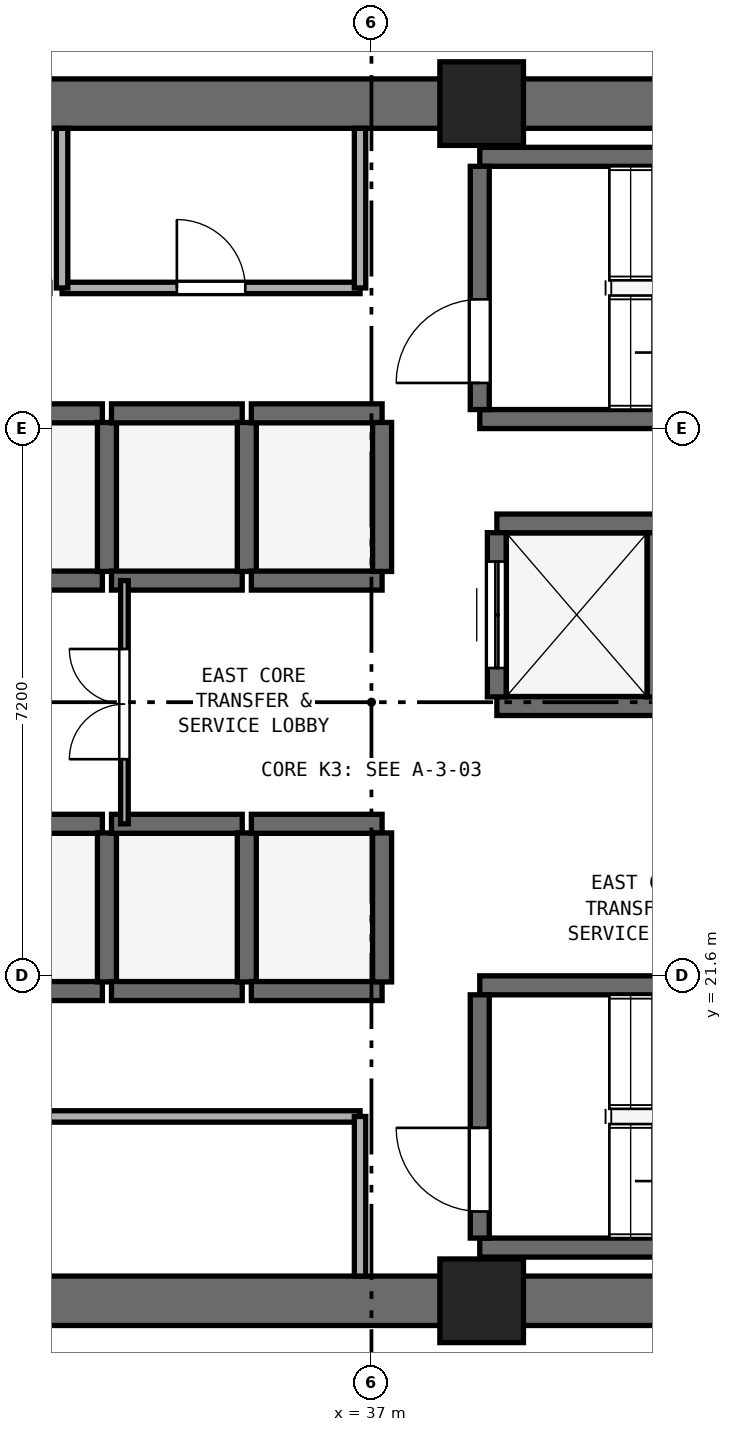
"""IFC4 building model, lengths in metres.
Left out: names, types, materials, properties, quantities, classifications, styles, units other than length and angle.
Written with IfcOpenShell. Run it as: python <this file> out.ifc"""

import sys

from ifc_helpers import new_model, si_unit, direction, frame, frame_2d, origin, origin_2d, place, context, subcontext, project, spatial, rectangle, extrude, element, fill, save


model = new_model("IFC4")
c1 = context("Model", 3, precision=1e-05, world=origin(), true_north=direction((0.0, 1.0)))
c2 = subcontext(c1, "Body", "Model", "MODEL_VIEW")
j1 = project(units=[si_unit("LENGTHUNIT", "METRE"), si_unit("PLANEANGLEUNIT", "RADIAN")], contexts=[c1])
p1 = place(None, origin())
s1 = spatial("IfcSite", under=j1, at=p1, CompositionType="ELEMENT")
p2 = place(p1, origin())
s2 = spatial("IfcBuilding", under=s1, at=p2, CompositionType="ELEMENT")
p3 = place(p2, frame((0.0, 0.0, 59.2)))
s3 = spatial("IfcBuildingStorey", under=s2, at=p3, CompositionType="ELEMENT", Elevation=59.2)
for number, where, z_axis, x_axis in (
    (1, (25.4, 17.325, 0.0), (0.0, 0.0, 1.0), (1.0, 0.0, 0.0)),
    (2, (25.4, 33.075, 0.0), (0.0, 0.0, 1.0), (1.0, 0.0, 0.0)),
):
    element("IfcWall", number, at=place(p3, frame(where, z_axis=z_axis, x_axis=x_axis)), inside=s3, PredefinedType="SHEAR", context=c2, shape_type="SweptSolid", body=[
        extrude(rectangle(XDim=23.2, YDim=0.65, at=frame_2d((11.6, 0.0))), origin(), (0.0, 0.0, 1.0), 3.525),
    ])
for number, where, z_axis, x_axis in (
    (3, (38.45, 17.325, 0.0), (0.0, 0.0, 1.0), (1.0, 0.0, 0.0)),
    (4, (38.45, 33.075, 0.0), (0.0, 0.0, 1.0), (1.0, 0.0, 0.0)),
):
    element("IfcColumn", number, at=place(p3, frame(where, z_axis=z_axis, x_axis=x_axis)), inside=s3, PredefinedType="PILASTER", context=c2, shape_type="SweptSolid", body=[
        extrude(rectangle(XDim=1.1, YDim=1.1, at=origin_2d()), origin(), (0.0, 0.0, 1.0), 3.8),
    ])
for number, where, z_axis, x_axis in (
    (5, (38.425, 28.925, 0.0), (0.0, 0.0, 1.0), (1.0, 0.0, 0.0)),
    (6, (38.425, 32.375, 0.0), (0.0, 0.0, 1.0), (1.0, 0.0, 0.0)),
):
    element("IfcWall", number, at=place(p3, frame(where, z_axis=z_axis, x_axis=x_axis)), inside=s3, PredefinedType="SHEAR", context=c2, shape_type="SweptSolid", body=[
        extrude(rectangle(XDim=7.3, YDim=0.25, at=frame_2d((3.65, 0.0))), origin(), (0.0, 0.0, 1.0), 3.525),
    ])
p4 = place(p3, frame((38.425, 29.05, 0.0), z_axis=(0.0, 0.0, 1.0), x_axis=(0.0, 1.0, 0.0)))
e7 = element("IfcWall", 7, at=p4, inside=s3, PredefinedType="SHEAR", context=c2, shape_type="SweptSolid", body=[
    extrude(rectangle(XDim=3.2, YDim=0.25, at=frame_2d((1.6, 0.0))), origin(), (0.0, 0.0, 1.0), 3.525),
])
p5 = place(p4, frame((0.35, 0.0, 0.0)))
e8 = element("IfcOpeningElement", 8, at=p5, cuts=e7, PredefinedType="OPENING", context=c2, shape_type="SweptSolid", body=[
    extrude(rectangle(XDim=1.1, YDim=2.15, at=frame_2d((0.55, 1.075))), frame((0.0, 0.135, 0.0), z_axis=(0.0, -1.0, 0.0), x_axis=(1.0, 0.0, 0.0)), (0.0, 0.0, 1.0), 0.27),
])
for number, where, z_axis, x_axis in (
    (9, (38.425, 18.025, 0.0), (0.0, 0.0, 1.0), (1.0, 0.0, 0.0)),
    (10, (38.425, 21.475, 0.0), (0.0, 0.0, 1.0), (1.0, 0.0, 0.0)),
):
    element("IfcWall", number, at=place(p3, frame(where, z_axis=z_axis, x_axis=x_axis)), inside=s3, PredefinedType="SHEAR", context=c2, shape_type="SweptSolid", body=[
        extrude(rectangle(XDim=7.3, YDim=0.25, at=frame_2d((3.65, 0.0))), origin(), (0.0, 0.0, 1.0), 3.525),
    ])
p6 = place(p3, frame((38.425, 18.15, 0.0), z_axis=(0.0, 0.0, 1.0), x_axis=(0.0, 1.0, 0.0)))
e11 = element("IfcWall", 11, at=p6, inside=s3, PredefinedType="SHEAR", context=c2, shape_type="SweptSolid", body=[
    extrude(rectangle(XDim=3.2, YDim=0.25, at=frame_2d((1.6, 0.0))), origin(), (0.0, 0.0, 1.0), 3.525),
])
p7 = place(p6, frame((0.35, 0.0, 0.0)))
e12 = element("IfcOpeningElement", 12, at=p7, cuts=e11, PredefinedType="OPENING", context=c2, shape_type="SweptSolid", body=[
    extrude(rectangle(XDim=1.1, YDim=2.15, at=frame_2d((0.55, 1.075))), frame((0.0, 0.135, 0.0), z_axis=(0.0, -1.0, 0.0), x_axis=(1.0, 0.0, 0.0)), (0.0, 0.0, 1.0), 0.27),
])
for number, where, z_axis, x_axis in (
    (13, (31.74, 21.4, 0.0), (0.0, 0.0, 1.0), (1.0, 0.0, 0.0)),
    (14, (31.74, 23.6, 0.0), (0.0, 0.0, 1.0), (1.0, 0.0, 0.0)),
):
    element("IfcWall", number, at=place(p3, frame(where, z_axis=z_axis, x_axis=x_axis)), inside=s3, PredefinedType="SHEAR", context=c2, shape_type="SweptSolid", body=[
        extrude(rectangle(XDim=1.72, YDim=0.25, at=frame_2d((0.86, 0.0))), origin(), (0.0, 0.0, 1.0), 3.525),
    ])
p8 = place(p3, frame((33.52, 21.52, 0.0), z_axis=(0.0, 0.0, 1.0), x_axis=(0.0, 1.0, 0.0)))
e15 = element("IfcWall", 15, at=p8, inside=s3, PredefinedType="SHEAR", context=c2, shape_type="SweptSolid", body=[
    extrude(rectangle(XDim=1.96, YDim=0.25, at=frame_2d((0.98, 0.0))), origin(), (0.0, 0.0, 1.0), 3.525),
])
for number, where, z_axis, x_axis in (
    (16, (33.58, 21.4, 0.0), (0.0, 0.0, 1.0), (1.0, 0.0, 0.0)),
    (17, (33.58, 23.6, 0.0), (0.0, 0.0, 1.0), (1.0, 0.0, 0.0)),
):
    element("IfcWall", number, at=place(p3, frame(where, z_axis=z_axis, x_axis=x_axis)), inside=s3, PredefinedType="SHEAR", context=c2, shape_type="SweptSolid", body=[
        extrude(rectangle(XDim=1.72, YDim=0.25, at=frame_2d((0.86, 0.0))), origin(), (0.0, 0.0, 1.0), 3.525),
    ])
p9 = place(p3, frame((35.36, 21.52, 0.0), z_axis=(0.0, 0.0, 1.0), x_axis=(0.0, 1.0, 0.0)))
e18 = element("IfcWall", 18, at=p9, inside=s3, PredefinedType="SHEAR", context=c2, shape_type="SweptSolid", body=[
    extrude(rectangle(XDim=1.96, YDim=0.25, at=frame_2d((0.98, 0.0))), origin(), (0.0, 0.0, 1.0), 3.525),
])
for number, where, z_axis, x_axis in (
    (19, (35.42, 21.4, 0.0), (0.0, 0.0, 1.0), (1.0, 0.0, 0.0)),
    (20, (35.42, 23.6, 0.0), (0.0, 0.0, 1.0), (1.0, 0.0, 0.0)),
):
    element("IfcWall", number, at=place(p3, frame(where, z_axis=z_axis, x_axis=x_axis)), inside=s3, PredefinedType="SHEAR", context=c2, shape_type="SweptSolid", body=[
        extrude(rectangle(XDim=1.72, YDim=0.25, at=frame_2d((0.86, 0.0))), origin(), (0.0, 0.0, 1.0), 3.525),
    ])
p10 = place(p3, frame((37.14, 21.52, 0.0), z_axis=(0.0, 0.0, 1.0), x_axis=(0.0, 1.0, 0.0)))
e21 = element("IfcWall", 21, at=p10, inside=s3, PredefinedType="SHEAR", context=c2, shape_type="SweptSolid", body=[
    extrude(rectangle(XDim=1.96, YDim=0.25, at=frame_2d((0.98, 0.0))), origin(), (0.0, 0.0, 1.0), 3.525),
])
for number, where, z_axis, x_axis in (
    (22, (31.74, 26.8, 0.0), (0.0, 0.0, 1.0), (1.0, 0.0, 0.0)),
    (23, (31.74, 29.0, 0.0), (0.0, 0.0, 1.0), (1.0, 0.0, 0.0)),
):
    element("IfcWall", number, at=place(p3, frame(where, z_axis=z_axis, x_axis=x_axis)), inside=s3, PredefinedType="SHEAR", context=c2, shape_type="SweptSolid", body=[
        extrude(rectangle(XDim=1.72, YDim=0.25, at=frame_2d((0.86, 0.0))), origin(), (0.0, 0.0, 1.0), 3.525),
    ])
p11 = place(p3, frame((33.52, 26.92, 0.0), z_axis=(0.0, 0.0, 1.0), x_axis=(0.0, 1.0, 0.0)))
e24 = element("IfcWall", 24, at=p11, inside=s3, PredefinedType="SHEAR", context=c2, shape_type="SweptSolid", body=[
    extrude(rectangle(XDim=1.96, YDim=0.25, at=frame_2d((0.98, 0.0))), origin(), (0.0, 0.0, 1.0), 3.525),
])
for number, where, z_axis, x_axis in (
    (25, (33.58, 26.8, 0.0), (0.0, 0.0, 1.0), (1.0, 0.0, 0.0)),
    (26, (33.58, 29.0, 0.0), (0.0, 0.0, 1.0), (1.0, 0.0, 0.0)),
):
    element("IfcWall", number, at=place(p3, frame(where, z_axis=z_axis, x_axis=x_axis)), inside=s3, PredefinedType="SHEAR", context=c2, shape_type="SweptSolid", body=[
        extrude(rectangle(XDim=1.72, YDim=0.25, at=frame_2d((0.86, 0.0))), origin(), (0.0, 0.0, 1.0), 3.525),
    ])
p12 = place(p3, frame((35.36, 26.92, 0.0), z_axis=(0.0, 0.0, 1.0), x_axis=(0.0, 1.0, 0.0)))
e27 = element("IfcWall", 27, at=p12, inside=s3, PredefinedType="SHEAR", context=c2, shape_type="SweptSolid", body=[
    extrude(rectangle(XDim=1.96, YDim=0.25, at=frame_2d((0.98, 0.0))), origin(), (0.0, 0.0, 1.0), 3.525),
])
for number, where, z_axis, x_axis in (
    (28, (35.42, 26.8, 0.0), (0.0, 0.0, 1.0), (1.0, 0.0, 0.0)),
    (29, (35.42, 29.0, 0.0), (0.0, 0.0, 1.0), (1.0, 0.0, 0.0)),
):
    element("IfcWall", number, at=place(p3, frame(where, z_axis=z_axis, x_axis=x_axis)), inside=s3, PredefinedType="SHEAR", context=c2, shape_type="SweptSolid", body=[
        extrude(rectangle(XDim=1.72, YDim=0.25, at=frame_2d((0.86, 0.0))), origin(), (0.0, 0.0, 1.0), 3.525),
    ])
p13 = place(p3, frame((37.14, 26.92, 0.0), z_axis=(0.0, 0.0, 1.0), x_axis=(0.0, 1.0, 0.0)))
e30 = element("IfcWall", 30, at=p13, inside=s3, PredefinedType="SHEAR", context=c2, shape_type="SweptSolid", body=[
    extrude(rectangle(XDim=1.96, YDim=0.25, at=frame_2d((0.98, 0.0))), origin(), (0.0, 0.0, 1.0), 3.525),
])
for number, where, z_axis, x_axis in (
    (31, (38.65, 25.15, 0.0), (0.0, 0.0, 1.0), (1.0, 0.0, 0.0)),
    (32, (38.65, 27.55, 0.0), (0.0, 0.0, 1.0), (1.0, 0.0, 0.0)),
):
    element("IfcWall", number, at=place(p3, frame(where, z_axis=z_axis, x_axis=x_axis)), inside=s3, PredefinedType="SHEAR", context=c2, shape_type="SweptSolid", body=[
        extrude(rectangle(XDim=2.1, YDim=0.25, at=frame_2d((1.05, 0.0))), origin(), (0.0, 0.0, 1.0), 3.525),
    ])
p14 = place(p3, frame((38.65, 25.27, 0.0), z_axis=(0.0, 0.0, 1.0), x_axis=(0.0, 1.0, 0.0)))
e33 = element("IfcWall", 33, at=p14, inside=s3, PredefinedType="SHEAR", context=c2, shape_type="SweptSolid", body=[
    extrude(rectangle(XDim=2.16, YDim=0.25, at=frame_2d((1.08, 0.0))), origin(), (0.0, 0.0, 1.0), 3.525),
])
p15 = place(p14, frame((0.38, 0.0, 0.0)))
e34 = element("IfcOpeningElement", 34, at=p15, cuts=e33, PredefinedType="OPENING", context=c2, shape_type="SweptSolid", body=[
    extrude(rectangle(XDim=1.4, YDim=2.2, at=frame_2d((0.7, 1.1))), frame((0.0, 0.135, 0.0), z_axis=(0.0, -1.0, 0.0), x_axis=(1.0, 0.0, 0.0)), (0.0, 0.0, 1.0), 0.27),
])
p16 = place(p3, frame((40.75, 25.27, 0.0), z_axis=(0.0, 0.0, 1.0), x_axis=(0.0, 1.0, 0.0)))
e35 = element("IfcWall", 35, at=p16, inside=s3, PredefinedType="SHEAR", context=c2, shape_type="SweptSolid", body=[
    extrude(rectangle(XDim=2.16, YDim=0.25, at=frame_2d((1.08, 0.0))), origin(), (0.0, 0.0, 1.0), 3.525),
])
p17 = place(p3, frame((32.93, 30.65, 0.0), z_axis=(0.0, 0.0, 1.0), x_axis=(1.0, 0.0, 0.0)))
e36 = element("IfcWall", 36, at=p17, inside=s3, PredefinedType="PARTITIONING", context=c2, shape_type="SweptSolid", body=[
    extrude(rectangle(XDim=3.92, YDim=0.15, at=frame_2d((1.96, 0.0))), origin(), (0.0, 0.0, 1.0), 3.525),
])
p18 = place(p17, frame((1.51, 0.0, 0.0)))
e37 = element("IfcOpeningElement", 37, at=p18, cuts=e36, PredefinedType="OPENING", context=c2, shape_type="SweptSolid", body=[
    extrude(rectangle(XDim=0.9, YDim=2.1, at=frame_2d((0.45, 1.05))), frame((0.0, 0.085, 0.0), z_axis=(0.0, -1.0, 0.0), x_axis=(1.0, 0.0, 0.0)), (0.0, 0.0, 1.0), 0.17),
])
for number, where, z_axis, x_axis in (
    (38, (32.93, 30.65, 0.0), (0.0, 0.0, 1.0), (0.0, 1.0, 0.0)),
    (39, (36.85, 30.65, 0.0), (0.0, 0.0, 1.0), (0.0, 1.0, 0.0)),
):
    element("IfcWall", number, at=place(p3, frame(where, z_axis=z_axis, x_axis=x_axis)), inside=s3, PredefinedType="PARTITIONING", context=c2, shape_type="SweptSolid", body=[
        extrude(rectangle(XDim=2.1, YDim=0.15, at=frame_2d((1.05, 0.0))), origin(), (0.0, 0.0, 1.0), 3.525),
    ])
p19 = place(p3, frame((26.17, 19.75, 0.0), z_axis=(0.0, 0.0, 1.0), x_axis=(1.0, 0.0, 0.0)))
e40 = element("IfcWall", 40, at=p19, inside=s3, PredefinedType="PARTITIONING", context=c2, shape_type="SweptSolid", body=[
    extrude(rectangle(XDim=10.68, YDim=0.15, at=frame_2d((5.34, 0.0))), origin(), (0.0, 0.0, 1.0), 3.525),
])
p20 = place(p19, frame((4.865, 0.0, 0.0)))
e41 = element("IfcOpeningElement", 41, at=p20, cuts=e40, PredefinedType="OPENING", context=c2, shape_type="SweptSolid", body=[
    extrude(rectangle(XDim=0.95, YDim=2.1, at=frame_2d((0.475, 1.05))), frame((0.0, 0.085, 0.0), z_axis=(0.0, -1.0, 0.0), x_axis=(1.0, 0.0, 0.0)), (0.0, 0.0, 1.0), 0.17),
])
p21 = place(p3, frame((36.85, 17.65, 0.0), z_axis=(0.0, 0.0, 1.0), x_axis=(0.0, 1.0, 0.0)))
e42 = element("IfcWall", 42, at=p21, inside=s3, PredefinedType="PARTITIONING", context=c2, shape_type="SweptSolid", body=[
    extrude(rectangle(XDim=2.1, YDim=0.15, at=frame_2d((1.05, 0.0))), origin(), (0.0, 0.0, 1.0), 3.525),
])
p22 = place(p3, frame((33.75, 23.6, 0.0), z_axis=(0.0, 0.0, 1.0), x_axis=(0.0, 1.0, 0.0)))
e43 = element("IfcWall", 43, at=p22, inside=s3, PredefinedType="PARTITIONING", context=c2, shape_type="SweptSolid", body=[
    extrude(rectangle(XDim=3.2, YDim=0.1, at=frame_2d((1.6, 0.0))), origin(), (0.0, 0.0, 1.0), 3.525),
])
p23 = place(p22, frame((0.85, 0.0, 0.0)))
e44 = element("IfcOpeningElement", 44, at=p23, cuts=e43, PredefinedType="OPENING", context=c2, shape_type="SweptSolid", body=[
    extrude(rectangle(XDim=1.45, YDim=2.12, at=frame_2d((0.725, 1.06))), frame((0.0, 0.06, 0.0), z_axis=(0.0, -1.0, 0.0), x_axis=(1.0, 0.0, 0.0)), (0.0, 0.0, 1.0), 0.12),
])
p24 = place(p5, origin())
e45 = element("IfcDoor", 45, at=p24, inside=s3, OperationType="SINGLE_SWING_LEFT", PredefinedType="DOOR", context=c2, shape_type="SweptSolid", body=[
    extrude(rectangle(XDim=1.1, YDim=2.15, at=frame_2d((0.55, 1.075))), frame((0.0, 0.025, 0.0), z_axis=(0.0, -1.0, 0.0), x_axis=(1.0, 0.0, 0.0)), (0.0, 0.0, 1.0), 0.05),
])
fill(e8, e45)
p25 = place(p7, origin())
e46 = element("IfcDoor", 46, at=p25, inside=s3, OperationType="SINGLE_SWING_RIGHT", PredefinedType="DOOR", context=c2, shape_type="SweptSolid", body=[
    extrude(rectangle(XDim=1.1, YDim=2.15, at=frame_2d((0.55, 1.075))), frame((0.0, 0.025, 0.0), z_axis=(0.0, -1.0, 0.0), x_axis=(1.0, 0.0, 0.0)), (0.0, 0.0, 1.0), 0.05),
])
fill(e12, e46)
p26 = place(p15, origin())
e47 = element("IfcDoor", 47, at=p26, inside=s3, OperationType="DOUBLE_DOOR_SLIDING", PredefinedType="DOOR", context=c2, shape_type="SweptSolid", body=[
    extrude(rectangle(XDim=1.4, YDim=2.2, at=frame_2d((0.7, 1.1))), frame((0.0, 0.025, 0.0), z_axis=(0.0, -1.0, 0.0), x_axis=(1.0, 0.0, 0.0)), (0.0, 0.0, 1.0), 0.05),
])
fill(e34, e47)
p27 = place(p18, origin())
e48 = element("IfcDoor", 48, at=p27, inside=s3, OperationType="SINGLE_SWING_LEFT", PredefinedType="DOOR", context=c2, shape_type="SweptSolid", body=[
    extrude(rectangle(XDim=0.9, YDim=2.1, at=frame_2d((0.45, 1.05))), frame((0.0, 0.025, 0.0), z_axis=(0.0, -1.0, 0.0), x_axis=(1.0, 0.0, 0.0)), (0.0, 0.0, 1.0), 0.05),
])
fill(e37, e48)
p28 = place(p23, origin())
e49 = element("IfcDoor", 49, at=p28, inside=s3, OperationType="DOUBLE_DOOR_SINGLE_SWING", PredefinedType="DOOR", context=c2, shape_type="SweptSolid", body=[
    extrude(rectangle(XDim=1.45, YDim=2.12, at=frame_2d((0.725, 1.06))), frame((0.0, 0.025, 0.0), z_axis=(0.0, -1.0, 0.0), x_axis=(1.0, 0.0, 0.0)), (0.0, 0.0, 1.0), 0.05),
])
fill(e44, e49)
save(model, sys.argv[1])
